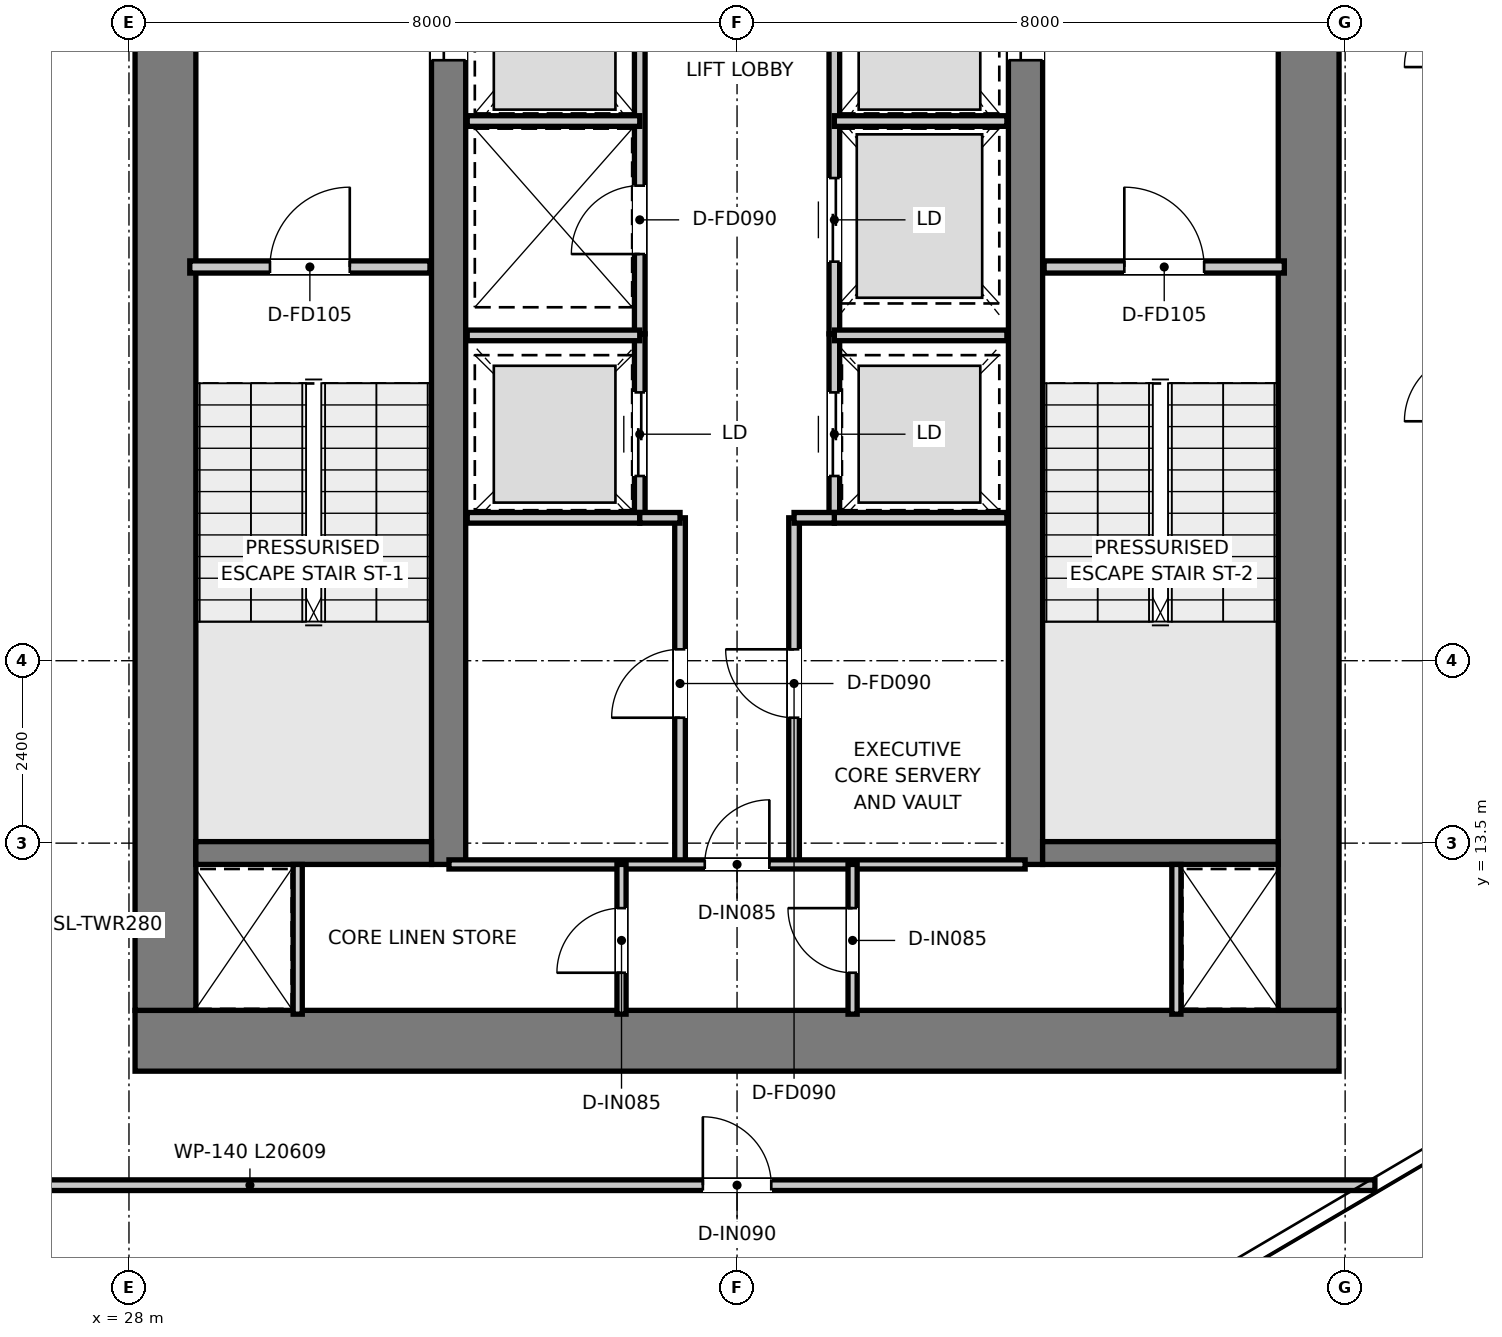
"""IFC4 building model, lengths in metres.
Left out: names, types, materials, properties, quantities, classifications, styles, units other than length and angle.
Written with IfcOpenShell. Run it as: python <this file> out.ifc"""

import sys

from ifc_helpers import new_model, si_unit, direction, frame, frame_2d, origin, place, context, subcontext, project, spatial, rectangle, extrude, element, fill, save


model = new_model("IFC4")
c1 = context("Model", 3, precision=1e-05, world=origin(), true_north=direction((0.0, 1.0)))
c2 = subcontext(c1, "Body", "Model", "MODEL_VIEW")
j1 = project(units=[si_unit("LENGTHUNIT", "METRE"), si_unit("PLANEANGLEUNIT", "RADIAN")], contexts=[c1])
p1 = place(None, origin())
s1 = spatial("IfcSite", under=j1, at=p1, CompositionType="ELEMENT")
p2 = place(p1, origin())
s2 = spatial("IfcBuilding", under=s1, at=p2, CompositionType="ELEMENT")
p3 = place(p2, frame((0.0, 0.0, 299.0)))
s3 = spatial("IfcBuildingStorey", under=s2, at=p3, CompositionType="ELEMENT", Elevation=299.0)
p4 = place(p3, frame((28.08, 10.9, 0.0), z_axis=(0.0, 0.0, 1.0), x_axis=(1.0, 0.0, 0.0)))
e1 = element("IfcWall", 1, at=p4, inside=s3, PredefinedType="SHEAR", context=c2, shape_type="SweptSolid", body=[
    extrude(rectangle(XDim=15.84, YDim=0.8, at=frame_2d((7.92, 0.0))), origin(), (0.0, 0.0, 1.0), 3.95),
])
for number, where, z_axis, x_axis in (
    (2, (28.48, 11.3, 0.0), (0.0, 0.0, 1.0), (0.0, 1.0, 0.0)),
    (3, (43.52, 11.3, 0.0), (0.0, 0.0, 1.0), (0.0, 1.0, 0.0)),
):
    element("IfcWall", number, at=place(p3, frame(where, z_axis=z_axis, x_axis=x_axis)), inside=s3, PredefinedType="SHEAR", context=c2, shape_type="SweptSolid", body=[
        extrude(rectangle(XDim=14.7, YDim=0.8, at=frame_2d((7.35, 0.0))), origin(), (0.0, 0.0, 1.0), 3.95),
    ])
p5 = place(p3, frame((32.205, 13.22, 0.0), z_axis=(0.0, 0.0, 1.0), x_axis=(0.0, 1.0, 0.0)))
e4 = element("IfcWall", 4, at=p5, inside=s3, PredefinedType="SHEAR", context=c2, shape_type="SweptSolid", body=[
    extrude(rectangle(XDim=12.78, YDim=0.45, at=frame_2d((6.39, 0.0))), origin(), (0.0, 0.0, 1.0), 3.95),
])
p6 = place(p5, frame((10.58, 0.0, 0.0)))
e5 = element("IfcOpeningElement", 5, at=p6, cuts=e4, PredefinedType="OPENING", context=c2, shape_type="SweptSolid", body=[
    extrude(rectangle(XDim=1.1, YDim=2.15, at=frame_2d((0.55, 1.075))), frame((0.0, 0.235, 0.0), z_axis=(0.0, -1.0, 0.0), x_axis=(1.0, 0.0, 0.0)), (0.0, 0.0, 1.0), 0.47),
])
p7 = place(p3, frame((39.795, 13.22, 0.0), z_axis=(0.0, 0.0, 1.0), x_axis=(0.0, 1.0, 0.0)))
e6 = element("IfcWall", 6, at=p7, inside=s3, PredefinedType="SHEAR", context=c2, shape_type="SweptSolid", body=[
    extrude(rectangle(XDim=12.78, YDim=0.45, at=frame_2d((6.39, 0.0))), origin(), (0.0, 0.0, 1.0), 3.95),
])
p8 = place(p7, frame((10.58, 0.0, 0.0)))
e7 = element("IfcOpeningElement", 7, at=p8, cuts=e6, PredefinedType="OPENING", context=c2, shape_type="SweptSolid", body=[
    extrude(rectangle(XDim=1.1, YDim=2.15, at=frame_2d((0.55, 1.075))), frame((0.0, 0.235, 0.0), z_axis=(0.0, -1.0, 0.0), x_axis=(1.0, 0.0, 0.0)), (0.0, 0.0, 1.0), 0.47),
])
for number, where, z_axis, x_axis in (
    (8, (28.88, 13.37, 0.0), (0.0, 0.0, 1.0), (1.0, 0.0, 0.0)),
    (9, (40.02, 13.37, 0.0), (0.0, 0.0, 1.0), (1.0, 0.0, 0.0)),
):
    element("IfcWall", number, at=place(p3, frame(where, z_axis=z_axis, x_axis=x_axis)), inside=s3, PredefinedType="SHEAR", context=c2, shape_type="SweptSolid", body=[
        extrude(rectangle(XDim=3.1, YDim=0.3, at=frame_2d((1.55, 0.0))), origin(), (0.0, 0.0, 1.0), 3.95),
    ])
p9 = place(p3, frame((28.8, 21.08, 0.0), z_axis=(0.0, 0.0, 1.0), x_axis=(1.0, 0.0, 0.0)))
e10 = element("IfcWall", 10, at=p9, inside=s3, PredefinedType="PARTITIONING", context=c2, shape_type="SweptSolid", body=[
    extrude(rectangle(XDim=3.16, YDim=0.16, at=frame_2d((1.58, 0.0))), origin(), (0.0, 0.0, 1.0), 3.67),
])
p10 = place(p9, frame((1.055, 0.0, 0.0)))
e11 = element("IfcOpeningElement", 11, at=p10, cuts=e10, PredefinedType="OPENING", context=c2, shape_type="SweptSolid", body=[
    extrude(rectangle(XDim=1.05, YDim=2.1, at=frame_2d((0.525, 1.05))), frame((0.0, 0.09, 0.0), z_axis=(0.0, -1.0, 0.0), x_axis=(1.0, 0.0, 0.0)), (0.0, 0.0, 1.0), 0.18),
])
p11 = place(p3, frame((40.04, 21.08, 0.0), z_axis=(0.0, 0.0, 1.0), x_axis=(1.0, 0.0, 0.0)))
e12 = element("IfcWall", 12, at=p11, inside=s3, PredefinedType="PARTITIONING", context=c2, shape_type="SweptSolid", body=[
    extrude(rectangle(XDim=3.16, YDim=0.16, at=frame_2d((1.58, 0.0))), origin(), (0.0, 0.0, 1.0), 3.67),
])
p12 = place(p11, frame((1.055, 0.0, 0.0)))
e13 = element("IfcOpeningElement", 13, at=p12, cuts=e12, PredefinedType="OPENING", context=c2, shape_type="SweptSolid", body=[
    extrude(rectangle(XDim=1.05, YDim=2.1, at=frame_2d((0.525, 1.05))), frame((0.0, 0.09, 0.0), z_axis=(0.0, -1.0, 0.0), x_axis=(1.0, 0.0, 0.0)), (0.0, 0.0, 1.0), 0.18),
])
p13 = place(p3, frame((34.72, 20.2, 0.0), z_axis=(0.0, 0.0, 1.0), x_axis=(0.0, 1.0, 0.0)))
e14 = element("IfcWall", 14, at=p13, inside=s3, PredefinedType="PARTITIONING", context=c2, shape_type="SweptSolid", body=[
    extrude(rectangle(XDim=5.78, YDim=0.14, at=frame_2d((2.89, 0.0))), origin(), (0.0, 0.0, 1.0), 2.82),
])
p14 = place(p13, frame((1.05, 0.0, 0.0)))
e15 = element("IfcOpeningElement", 15, at=p14, cuts=e14, PredefinedType="OPENING", context=c2, shape_type="SweptSolid", body=[
    extrude(rectangle(XDim=0.9, YDim=2.1, at=frame_2d((0.45, 1.05))), frame((0.0, 0.08, 0.0), z_axis=(0.0, -1.0, 0.0), x_axis=(1.0, 0.0, 0.0)), (0.0, 0.0, 1.0), 0.16),
])
p15 = place(p3, frame((37.28, 20.2, 0.0), z_axis=(0.0, 0.0, 1.0), x_axis=(0.0, 1.0, 0.0)))
e16 = element("IfcWall", 16, at=p15, inside=s3, PredefinedType="PARTITIONING", context=c2, shape_type="SweptSolid", body=[
    extrude(rectangle(XDim=5.78, YDim=0.14, at=frame_2d((2.89, 0.0))), origin(), (0.0, 0.0, 1.0), 2.82),
])
p16 = place(p15, frame((0.95, 0.0, 0.0)))
e17 = element("IfcOpeningElement", 17, at=p16, cuts=e16, PredefinedType="OPENING", context=c2, shape_type="SweptSolid", body=[
    extrude(rectangle(XDim=1.1, YDim=2.15, at=frame_2d((0.55, 1.075))), frame((0.0, 0.08, 0.0), z_axis=(0.0, -1.0, 0.0), x_axis=(1.0, 0.0, 0.0)), (0.0, 0.0, 1.0), 0.16),
])
for number, where, z_axis, x_axis in (
    (18, (32.45, 23.0, 0.0), (0.0, 0.0, 1.0), (1.0, 0.0, 0.0)),
    (19, (37.28, 23.0, 0.0), (0.0, 0.0, 1.0), (1.0, 0.0, 0.0)),
):
    element("IfcWall", number, at=place(p3, frame(where, z_axis=z_axis, x_axis=x_axis)), inside=s3, PredefinedType="PARTITIONING", context=c2, shape_type="SweptSolid", body=[
        extrude(rectangle(XDim=2.27, YDim=0.14, at=frame_2d((1.135, 0.0))), origin(), (0.0, 0.0, 1.0), 2.82),
    ])
p17 = place(p3, frame((34.72, 17.78, 0.0), z_axis=(0.0, 0.0, 1.0), x_axis=(0.0, 1.0, 0.0)))
e20 = element("IfcWall", 20, at=p17, inside=s3, PredefinedType="PARTITIONING", context=c2, shape_type="SweptSolid", body=[
    extrude(rectangle(XDim=2.42, YDim=0.14, at=frame_2d((1.21, 0.0))), origin(), (0.0, 0.0, 1.0), 3.67),
])
p18 = place(p17, frame((0.55, 0.0, 0.0)))
e21 = element("IfcOpeningElement", 21, at=p18, cuts=e20, PredefinedType="OPENING", context=c2, shape_type="SweptSolid", body=[
    extrude(rectangle(XDim=1.1, YDim=2.15, at=frame_2d((0.55, 1.075))), frame((0.0, 0.08, 0.0), z_axis=(0.0, -1.0, 0.0), x_axis=(1.0, 0.0, 0.0)), (0.0, 0.0, 1.0), 0.16),
])
p19 = place(p3, frame((37.28, 17.78, 0.0), z_axis=(0.0, 0.0, 1.0), x_axis=(0.0, 1.0, 0.0)))
e22 = element("IfcWall", 22, at=p19, inside=s3, PredefinedType="PARTITIONING", context=c2, shape_type="SweptSolid", body=[
    extrude(rectangle(XDim=2.42, YDim=0.14, at=frame_2d((1.21, 0.0))), origin(), (0.0, 0.0, 1.0), 3.67),
])
p20 = place(p19, frame((0.55, 0.0, 0.0)))
e23 = element("IfcOpeningElement", 23, at=p20, cuts=e22, PredefinedType="OPENING", context=c2, shape_type="SweptSolid", body=[
    extrude(rectangle(XDim=1.1, YDim=2.15, at=frame_2d((0.55, 1.075))), frame((0.0, 0.08, 0.0), z_axis=(0.0, -1.0, 0.0), x_axis=(1.0, 0.0, 0.0)), (0.0, 0.0, 1.0), 0.16),
])
for number, where, z_axis, x_axis in (
    (24, (32.45, 17.78, 0.0), (0.0, 0.0, 1.0), (1.0, 0.0, 0.0)),
    (25, (32.45, 20.18, 0.0), (0.0, 0.0, 1.0), (1.0, 0.0, 0.0)),
    (26, (37.28, 17.78, 0.0), (0.0, 0.0, 1.0), (1.0, 0.0, 0.0)),
    (27, (37.28, 20.18, 0.0), (0.0, 0.0, 1.0), (1.0, 0.0, 0.0)),
):
    element("IfcWall", number, at=place(p3, frame(where, z_axis=z_axis, x_axis=x_axis)), inside=s3, PredefinedType="PARTITIONING", context=c2, shape_type="SweptSolid", body=[
        extrude(rectangle(XDim=2.27, YDim=0.14, at=frame_2d((1.135, 0.0))), origin(), (0.0, 0.0, 1.0), 3.67),
    ])
p21 = place(p3, frame((35.25, 13.22, 0.0), z_axis=(0.0, 0.0, 1.0), x_axis=(0.0, 1.0, 0.0)))
e28 = element("IfcWall", 28, at=p21, inside=s3, PredefinedType="PARTITIONING", context=c2, shape_type="SweptSolid", body=[
    extrude(rectangle(XDim=4.56, YDim=0.14, at=frame_2d((2.28, 0.0))), origin(), (0.0, 0.0, 1.0), 3.67),
])
p22 = place(p21, frame((1.93, 0.0, 0.0)))
e29 = element("IfcOpeningElement", 29, at=p22, cuts=e28, PredefinedType="OPENING", context=c2, shape_type="SweptSolid", body=[
    extrude(rectangle(XDim=0.9, YDim=2.1, at=frame_2d((0.45, 1.05))), frame((0.0, 0.08, 0.0), z_axis=(0.0, -1.0, 0.0), x_axis=(1.0, 0.0, 0.0)), (0.0, 0.0, 1.0), 0.16),
])
p23 = place(p3, frame((34.72, 17.78, 0.0), z_axis=(0.0, 0.0, 1.0), x_axis=(1.0, 0.0, 0.0)))
e30 = element("IfcWall", 30, at=p23, inside=s3, PredefinedType="PARTITIONING", context=c2, shape_type="SweptSolid", body=[
    extrude(rectangle(XDim=0.53, YDim=0.14, at=frame_2d((0.265, 0.0))), origin(), (0.0, 0.0, 1.0), 3.67),
])
p24 = place(p3, frame((36.75, 13.22, 0.0), z_axis=(0.0, 0.0, 1.0), x_axis=(0.0, 1.0, 0.0)))
e31 = element("IfcWall", 31, at=p24, inside=s3, PredefinedType="PARTITIONING", context=c2, shape_type="SweptSolid", body=[
    extrude(rectangle(XDim=4.56, YDim=0.14, at=frame_2d((2.28, 0.0))), origin(), (0.0, 0.0, 1.0), 3.67),
])
p25 = place(p24, frame((1.93, 0.0, 0.0)))
e32 = element("IfcOpeningElement", 32, at=p25, cuts=e31, PredefinedType="OPENING", context=c2, shape_type="SweptSolid", body=[
    extrude(rectangle(XDim=0.9, YDim=2.1, at=frame_2d((0.45, 1.05))), frame((0.0, 0.08, 0.0), z_axis=(0.0, -1.0, 0.0), x_axis=(1.0, 0.0, 0.0)), (0.0, 0.0, 1.0), 0.16),
])
p26 = place(p3, frame((36.75, 17.78, 0.0), z_axis=(0.0, 0.0, 1.0), x_axis=(1.0, 0.0, 0.0)))
e33 = element("IfcWall", 33, at=p26, inside=s3, PredefinedType="PARTITIONING", context=c2, shape_type="SweptSolid", body=[
    extrude(rectangle(XDim=0.53, YDim=0.14, at=frame_2d((0.265, 0.0))), origin(), (0.0, 0.0, 1.0), 3.67),
])
for number, where, z_axis, x_axis in (
    (34, (30.22, 11.25, 0.0), (0.0, 0.0, 1.0), (0.0, 1.0, 0.0)),
    (35, (41.78, 11.25, 0.0), (0.0, 0.0, 1.0), (0.0, 1.0, 0.0)),
):
    element("IfcWall", number, at=place(p3, frame(where, z_axis=z_axis, x_axis=x_axis)), inside=s3, PredefinedType="PARTITIONING", context=c2, shape_type="SweptSolid", body=[
        extrude(rectangle(XDim=1.97, YDim=0.12, at=frame_2d((0.985, 0.0))), origin(), (0.0, 0.0, 1.0), 3.67),
    ])
p27 = place(p3, frame((32.21, 13.22, 0.0), z_axis=(0.0, 0.0, 1.0), x_axis=(1.0, 0.0, 0.0)))
e36 = element("IfcWall", 36, at=p27, inside=s3, PredefinedType="PARTITIONING", context=c2, shape_type="SweptSolid", body=[
    extrude(rectangle(XDim=7.58, YDim=0.12, at=frame_2d((3.79, 0.0))), origin(), (0.0, 0.0, 1.0), 3.67),
])
p28 = place(p27, frame((3.365, 0.0, 0.0)))
e37 = element("IfcOpeningElement", 37, at=p28, cuts=e36, PredefinedType="OPENING", context=c2, shape_type="SweptSolid", body=[
    extrude(rectangle(XDim=0.85, YDim=2.1, at=frame_2d((0.425, 1.05))), frame((0.0, 0.07, 0.0), z_axis=(0.0, -1.0, 0.0), x_axis=(1.0, 0.0, 0.0)), (0.0, 0.0, 1.0), 0.14),
])
p29 = place(p3, frame((34.48, 11.25, 0.0), z_axis=(0.0, 0.0, 1.0), x_axis=(0.0, 1.0, 0.0)))
e38 = element("IfcWall", 38, at=p29, inside=s3, PredefinedType="PARTITIONING", context=c2, shape_type="SweptSolid", body=[
    extrude(rectangle(XDim=1.97, YDim=0.12, at=frame_2d((0.985, 0.0))), origin(), (0.0, 0.0, 1.0), 3.67),
])
p30 = place(p29, frame((0.545, 0.0, 0.0)))
e39 = element("IfcOpeningElement", 39, at=p30, cuts=e38, PredefinedType="OPENING", context=c2, shape_type="SweptSolid", body=[
    extrude(rectangle(XDim=0.85, YDim=2.1, at=frame_2d((0.425, 1.05))), frame((0.0, 0.07, 0.0), z_axis=(0.0, -1.0, 0.0), x_axis=(1.0, 0.0, 0.0)), (0.0, 0.0, 1.0), 0.14),
])
p31 = place(p3, frame((37.52, 11.25, 0.0), z_axis=(0.0, 0.0, 1.0), x_axis=(0.0, 1.0, 0.0)))
e40 = element("IfcWall", 40, at=p31, inside=s3, PredefinedType="PARTITIONING", context=c2, shape_type="SweptSolid", body=[
    extrude(rectangle(XDim=1.97, YDim=0.12, at=frame_2d((0.985, 0.0))), origin(), (0.0, 0.0, 1.0), 3.67),
])
p32 = place(p31, frame((0.545, 0.0, 0.0)))
e41 = element("IfcOpeningElement", 41, at=p32, cuts=e40, PredefinedType="OPENING", context=c2, shape_type="SweptSolid", body=[
    extrude(rectangle(XDim=0.85, YDim=2.1, at=frame_2d((0.425, 1.05))), frame((0.0, 0.07, 0.0), z_axis=(0.0, -1.0, 0.0), x_axis=(1.0, 0.0, 0.0)), (0.0, 0.0, 1.0), 0.14),
])
p33 = place(p3, frame((23.783, 9.0, 0.0), z_axis=(0.0, 0.0, 1.0), x_axis=(1.0, 0.0, 0.0)))
e42 = element("IfcWall", 42, at=p33, inside=s3, PredefinedType="PARTITIONING", context=c2, shape_type="SweptSolid", body=[
    extrude(rectangle(XDim=20.609, YDim=0.14, at=frame_2d((10.304, 0.0))), origin(), (0.0, 0.0, 1.0), 3.67),
])
p34 = place(p33, frame((11.767, 0.0, 0.0)))
e43 = element("IfcOpeningElement", 43, at=p34, cuts=e42, PredefinedType="OPENING", context=c2, shape_type="SweptSolid", body=[
    extrude(rectangle(XDim=0.9, YDim=2.1, at=frame_2d((0.45, 1.05))), frame((0.0, 0.08, 0.0), z_axis=(0.0, -1.0, 0.0), x_axis=(1.0, 0.0, 0.0)), (0.0, 0.0, 1.0), 0.16),
])
p35 = place(p10, origin())
e44 = element("IfcDoor", 44, at=p35, inside=s3, OperationType="SINGLE_SWING_RIGHT", PredefinedType="DOOR", context=c2, shape_type="SweptSolid", body=[
    extrude(rectangle(XDim=1.05, YDim=2.1, at=frame_2d((0.525, 1.05))), frame((0.0, 0.025, 0.0), z_axis=(0.0, -1.0, 0.0), x_axis=(1.0, 0.0, 0.0)), (0.0, 0.0, 1.0), 0.05),
])
fill(e11, e44)
p36 = place(p12, origin())
e45 = element("IfcDoor", 45, at=p36, inside=s3, OperationType="SINGLE_SWING_LEFT", PredefinedType="DOOR", context=c2, shape_type="SweptSolid", body=[
    extrude(rectangle(XDim=1.05, YDim=2.1, at=frame_2d((0.525, 1.05))), frame((0.0, 0.025, 0.0), z_axis=(0.0, -1.0, 0.0), x_axis=(1.0, 0.0, 0.0)), (0.0, 0.0, 1.0), 0.05),
])
fill(e13, e45)
p37 = place(p6, origin())
e46 = element("IfcDoor", 46, at=p37, inside=s3, OperationType="DOUBLE_DOOR_SLIDING", PredefinedType="DOOR", context=c2, shape_type="SweptSolid", body=[
    extrude(rectangle(XDim=1.1, YDim=2.15, at=frame_2d((0.55, 1.075))), frame((0.0, 0.025, 0.0), z_axis=(0.0, -1.0, 0.0), x_axis=(1.0, 0.0, 0.0)), (0.0, 0.0, 1.0), 0.05),
])
fill(e5, e46)
p38 = place(p8, origin())
e47 = element("IfcDoor", 47, at=p38, inside=s3, OperationType="DOUBLE_DOOR_SLIDING", PredefinedType="DOOR", context=c2, shape_type="SweptSolid", body=[
    extrude(rectangle(XDim=1.1, YDim=2.15, at=frame_2d((0.55, 1.075))), frame((0.0, 0.025, 0.0), z_axis=(0.0, -1.0, 0.0), x_axis=(1.0, 0.0, 0.0)), (0.0, 0.0, 1.0), 0.05),
])
fill(e7, e47)
p39 = place(p14, origin())
e48 = element("IfcDoor", 48, at=p39, inside=s3, OperationType="SINGLE_SWING_LEFT", PredefinedType="DOOR", context=c2, shape_type="SweptSolid", body=[
    extrude(rectangle(XDim=0.9, YDim=2.1, at=frame_2d((0.45, 1.05))), frame((0.0, 0.025, 0.0), z_axis=(0.0, -1.0, 0.0), x_axis=(1.0, 0.0, 0.0)), (0.0, 0.0, 1.0), 0.05),
])
fill(e15, e48)
p40 = place(p16, origin())
e49 = element("IfcDoor", 49, at=p40, inside=s3, OperationType="DOUBLE_DOOR_SLIDING", PredefinedType="DOOR", context=c2, shape_type="SweptSolid", body=[
    extrude(rectangle(XDim=1.1, YDim=2.15, at=frame_2d((0.55, 1.075))), frame((0.0, 0.025, 0.0), z_axis=(0.0, -1.0, 0.0), x_axis=(1.0, 0.0, 0.0)), (0.0, 0.0, 1.0), 0.05),
])
fill(e17, e49)
p41 = place(p18, origin())
e50 = element("IfcDoor", 50, at=p41, inside=s3, OperationType="DOUBLE_DOOR_SLIDING", PredefinedType="DOOR", context=c2, shape_type="SweptSolid", body=[
    extrude(rectangle(XDim=1.1, YDim=2.15, at=frame_2d((0.55, 1.075))), frame((0.0, 0.025, 0.0), z_axis=(0.0, -1.0, 0.0), x_axis=(1.0, 0.0, 0.0)), (0.0, 0.0, 1.0), 0.05),
])
fill(e21, e50)
p42 = place(p20, origin())
e51 = element("IfcDoor", 51, at=p42, inside=s3, OperationType="DOUBLE_DOOR_SLIDING", PredefinedType="DOOR", context=c2, shape_type="SweptSolid", body=[
    extrude(rectangle(XDim=1.1, YDim=2.15, at=frame_2d((0.55, 1.075))), frame((0.0, 0.025, 0.0), z_axis=(0.0, -1.0, 0.0), x_axis=(1.0, 0.0, 0.0)), (0.0, 0.0, 1.0), 0.05),
])
fill(e23, e51)
p43 = place(p22, origin())
e52 = element("IfcDoor", 52, at=p43, inside=s3, OperationType="SINGLE_SWING_LEFT", PredefinedType="DOOR", context=c2, shape_type="SweptSolid", body=[
    extrude(rectangle(XDim=0.9, YDim=2.1, at=frame_2d((0.45, 1.05))), frame((0.0, 0.025, 0.0), z_axis=(0.0, -1.0, 0.0), x_axis=(1.0, 0.0, 0.0)), (0.0, 0.0, 1.0), 0.05),
])
fill(e29, e52)
p44 = place(p25, origin())
e53 = element("IfcDoor", 53, at=p44, inside=s3, OperationType="SINGLE_SWING_RIGHT", PredefinedType="DOOR", context=c2, shape_type="SweptSolid", body=[
    extrude(rectangle(XDim=0.9, YDim=2.1, at=frame_2d((0.45, 1.05))), frame((0.0, 0.025, 0.0), z_axis=(0.0, -1.0, 0.0), x_axis=(1.0, 0.0, 0.0)), (0.0, 0.0, 1.0), 0.05),
])
fill(e32, e53)
p45 = place(p28, origin())
e54 = element("IfcDoor", 54, at=p45, inside=s3, OperationType="SINGLE_SWING_RIGHT", PredefinedType="DOOR", context=c2, shape_type="SweptSolid", body=[
    extrude(rectangle(XDim=0.85, YDim=2.1, at=frame_2d((0.425, 1.05))), frame((0.0, 0.025, 0.0), z_axis=(0.0, -1.0, 0.0), x_axis=(1.0, 0.0, 0.0)), (0.0, 0.0, 1.0), 0.05),
])
fill(e37, e54)
p46 = place(p30, origin())
e55 = element("IfcDoor", 55, at=p46, inside=s3, OperationType="SINGLE_SWING_LEFT", PredefinedType="DOOR", context=c2, shape_type="SweptSolid", body=[
    extrude(rectangle(XDim=0.85, YDim=2.1, at=frame_2d((0.425, 1.05))), frame((0.0, 0.025, 0.0), z_axis=(0.0, -1.0, 0.0), x_axis=(1.0, 0.0, 0.0)), (0.0, 0.0, 1.0), 0.05),
])
fill(e39, e55)
p47 = place(p32, origin())
e56 = element("IfcDoor", 56, at=p47, inside=s3, OperationType="SINGLE_SWING_RIGHT", PredefinedType="DOOR", context=c2, shape_type="SweptSolid", body=[
    extrude(rectangle(XDim=0.85, YDim=2.1, at=frame_2d((0.425, 1.05))), frame((0.0, 0.025, 0.0), z_axis=(0.0, -1.0, 0.0), x_axis=(1.0, 0.0, 0.0)), (0.0, 0.0, 1.0), 0.05),
])
fill(e41, e56)
p48 = place(p34, origin())
e57 = element("IfcDoor", 57, at=p48, inside=s3, OperationType="SINGLE_SWING_LEFT", PredefinedType="DOOR", context=c2, shape_type="SweptSolid", body=[
    extrude(rectangle(XDim=0.9, YDim=2.1, at=frame_2d((0.45, 1.05))), frame((0.0, 0.025, 0.0), z_axis=(0.0, -1.0, 0.0), x_axis=(1.0, 0.0, 0.0)), (0.0, 0.0, 1.0), 0.05),
])
fill(e43, e57)
save(model, sys.argv[1])
